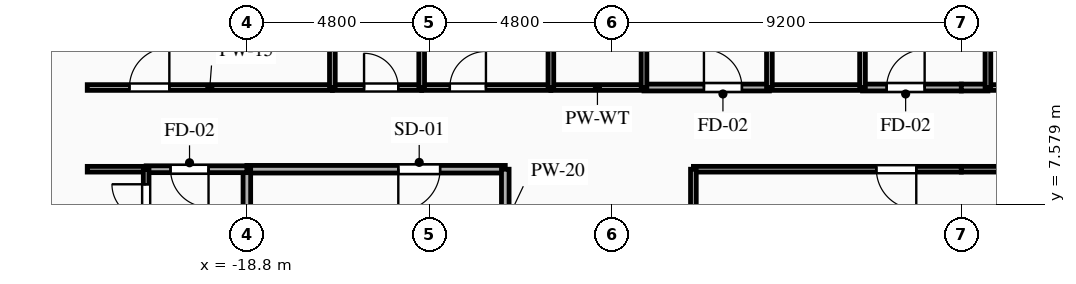
"""IFC4 building model, lengths in metres.
Left out: names, types, materials, properties, quantities, classifications, styles, units other than length and angle.
Written with IfcOpenShell. Run it as: python <this file> out.ifc"""

import sys

from ifc_helpers import new_model, si_unit, direction, frame, frame_2d, origin, place, context, subcontext, project, spatial, rectangle, extrude, element, fill, save


model = new_model("IFC4")
c1 = context("Model", 3, precision=1e-05, world=origin(), true_north=direction((0.0, 1.0)))
c2 = subcontext(c1, "Body", "Model", "MODEL_VIEW")
j1 = project(units=[si_unit("LENGTHUNIT", "METRE"), si_unit("PLANEANGLEUNIT", "RADIAN")], contexts=[c1])
p1 = place(None, origin())
s1 = spatial("IfcSite", under=j1, at=p1, CompositionType="ELEMENT")
p2 = place(p1, origin())
s2 = spatial("IfcBuilding", under=s1, at=p2, CompositionType="ELEMENT")
p3 = place(p2, frame((0.0, 0.0, 57.15)))
s3 = spatial("IfcBuildingStorey", under=s2, at=p3, CompositionType="ELEMENT", Elevation=57.15)
p4 = place(p3, frame((-12.0, 8.5, 0.0), z_axis=(0.0, 0.0, 1.0), x_axis=(-1.0, 0.0, 0.0)))
e1 = element("IfcWall", 1, at=p4, inside=s3, PredefinedType="PARTITIONING", context=c2, shape_type="SweptSolid", body=[
    extrude(rectangle(XDim=6.8, YDim=0.2, at=frame_2d((3.4, 0.0))), origin(), (0.0, 0.0, 1.0), 3.035),
])
p5 = place(p4, frame((1.715, 0.0, 0.0)))
e2 = element("IfcOpeningElement", 2, at=p5, cuts=e1, PredefinedType="OPENING", context=c2, shape_type="SweptSolid", body=[
    extrude(rectangle(XDim=1.1, YDim=2.15, at=frame_2d((0.55, 1.075))), frame((0.0, 0.11, 0.0), z_axis=(0.0, -1.0, 0.0), x_axis=(1.0, 0.0, 0.0)), (0.0, 0.0, 1.0), 0.22),
])
p6 = place(p3, frame((-12.0, 5.6, 0.0), z_axis=(0.0, 0.0, 1.0), x_axis=(0.0, 1.0, 0.0)))
e3 = element("IfcWall", 3, at=p6, inside=s3, PredefinedType="PARTITIONING", context=c2, shape_type="SweptSolid", body=[
    extrude(rectangle(XDim=2.9, YDim=0.2, at=frame_2d((1.45, 0.0))), origin(), (0.0, 0.0, 1.0), 3.035),
])
p7 = place(p3, frame((-18.8, 8.5, 0.0), z_axis=(0.0, 0.0, 1.0), x_axis=(0.0, -1.0, 0.0)))
e4 = element("IfcWall", 4, at=p7, inside=s3, PredefinedType="PARTITIONING", context=c2, shape_type="SweptSolid", body=[
    extrude(rectangle(XDim=2.9, YDim=0.2, at=frame_2d((1.45, 0.0))), origin(), (0.0, 0.0, 1.0), 2.52),
])
p8 = place(p3, frame((-18.8, 8.5, 0.0), z_axis=(0.0, 0.0, 1.0), x_axis=(-1.0, 0.0, 0.0)))
e5 = element("IfcWall", 5, at=p8, inside=s3, PredefinedType="PARTITIONING", context=c2, shape_type="SweptSolid", body=[
    extrude(rectangle(XDim=2.65, YDim=0.18, at=frame_2d((1.325, 0.0))), origin(), (0.0, 0.0, 1.0), 3.035),
])
p9 = place(p8, frame((1.009, 0.0, 0.0)))
e6 = element("IfcOpeningElement", 6, at=p9, cuts=e5, PredefinedType="OPENING", context=c2, shape_type="SweptSolid", body=[
    extrude(rectangle(XDim=1.0, YDim=2.15, at=frame_2d((0.5, 1.075))), frame((0.0, 0.1, 0.0), z_axis=(0.0, -1.0, 0.0), x_axis=(1.0, 0.0, 0.0)), (0.0, 0.0, 1.0), 0.2),
])
p10 = place(p3, frame((-21.45, 8.5, 0.0), z_axis=(0.0, 0.0, 1.0), x_axis=(-1.0, 0.0, 0.0)))
e7 = element("IfcWall", 7, at=p10, inside=s3, PredefinedType="PARTITIONING", context=c2, shape_type="SweptSolid", body=[
    extrude(rectangle(XDim=1.55, YDim=0.15, at=frame_2d((0.775, 0.0))), origin(), (0.0, 0.0, 1.0), 3.035),
])
p11 = place(p3, frame((-23.0, 10.65, 0.0), z_axis=(0.0, 0.0, 1.0), x_axis=(1.0, 0.0, 0.0)))
e8 = element("IfcWall", 8, at=p11, inside=s3, PredefinedType="PARTITIONING", context=c2, shape_type="SweptSolid", body=[
    extrude(rectangle(XDim=6.45, YDim=0.15, at=frame_2d((3.225, 0.0))), origin(), (0.0, 0.0, 1.0), 3.035),
])
p12 = place(p11, frame((1.11, 0.0, 0.0)))
e9 = element("IfcOpeningElement", 9, at=p12, cuts=e8, PredefinedType="OPENING", context=c2, shape_type="SweptSolid", body=[
    extrude(rectangle(XDim=1.05, YDim=2.15, at=frame_2d((0.525, 1.075))), frame((0.0, 0.085, 0.0), z_axis=(0.0, -1.0, 0.0), x_axis=(1.0, 0.0, 0.0)), (0.0, 0.0, 1.0), 0.17),
])
p13 = place(p3, frame((-16.55, 10.65, 0.0), z_axis=(0.0, 0.0, 1.0), x_axis=(1.0, 0.0, 0.0)))
e10 = element("IfcWall", 10, at=p13, inside=s3, PredefinedType="PLUMBINGWALL", context=c2, shape_type="SweptSolid", body=[
    extrude(rectangle(XDim=2.35, YDim=0.15, at=frame_2d((1.175, 0.0))), origin(), (0.0, 0.0, 1.0), 3.035),
])
p14 = place(p13, frame((0.834, 0.0, 0.0)))
e11 = element("IfcOpeningElement", 11, at=p14, cuts=e10, PredefinedType="OPENING", context=c2, shape_type="SweptSolid", body=[
    extrude(rectangle(XDim=0.9, YDim=2.1, at=frame_2d((0.45, 1.05))), frame((0.0, 0.085, 0.0), z_axis=(0.0, -1.0, 0.0), x_axis=(1.0, 0.0, 0.0)), (0.0, 0.0, 1.0), 0.17),
])
p15 = place(p3, frame((-14.2, 10.65, 0.0), z_axis=(0.0, 0.0, 1.0), x_axis=(1.0, 0.0, 0.0)))
e12 = element("IfcWall", 12, at=p15, inside=s3, PredefinedType="PARTITIONING", context=c2, shape_type="SweptSolid", body=[
    extrude(rectangle(XDim=3.4, YDim=0.15, at=frame_2d((1.7, 0.0))), origin(), (0.0, 0.0, 1.0), 3.035),
])
p16 = place(p15, frame((0.741, 0.0, 0.0)))
e13 = element("IfcOpeningElement", 13, at=p16, cuts=e12, PredefinedType="OPENING", context=c2, shape_type="SweptSolid", body=[
    extrude(rectangle(XDim=0.95, YDim=2.1, at=frame_2d((0.475, 1.05))), frame((0.0, 0.085, 0.0), z_axis=(0.0, -1.0, 0.0), x_axis=(1.0, 0.0, 0.0)), (0.0, 0.0, 1.0), 0.17),
])
p17 = place(p3, frame((-8.35, 10.65, 0.0), z_axis=(0.0, 0.0, 1.0), x_axis=(1.0, 0.0, 0.0)))
e14 = element("IfcWall", 14, at=p17, inside=s3, PredefinedType="PARTITIONING", context=c2, shape_type="SweptSolid", body=[
    extrude(rectangle(XDim=3.3, YDim=0.18, at=frame_2d((1.65, 0.0))), origin(), (0.0, 0.0, 1.0), 3.035),
])
p18 = place(p17, frame((1.577, 0.0, 0.0)))
e15 = element("IfcOpeningElement", 15, at=p18, cuts=e14, PredefinedType="OPENING", context=c2, shape_type="SweptSolid", body=[
    extrude(rectangle(XDim=1.0, YDim=2.15, at=frame_2d((0.5, 1.075))), frame((0.0, 0.1, 0.0), z_axis=(0.0, -1.0, 0.0), x_axis=(1.0, 0.0, 0.0)), (0.0, 0.0, 1.0), 0.2),
])
p19 = place(p3, frame((-10.8, 10.65, 0.0), z_axis=(0.0, 0.0, 1.0), x_axis=(1.0, 0.0, 0.0)))
e16 = element("IfcWall", 16, at=p19, inside=s3, PredefinedType="PLUMBINGWALL", context=c2, shape_type="SweptSolid", body=[
    extrude(rectangle(XDim=2.45, YDim=0.15, at=frame_2d((1.225, 0.0))), origin(), (0.0, 0.0, 1.0), 3.035),
])
p20 = place(p3, frame((-2.6, 10.65, 0.0), z_axis=(0.0, 0.0, 1.0), x_axis=(1.0, 0.0, 0.0)))
e17 = element("IfcWall", 17, at=p20, inside=s3, PredefinedType="PARTITIONING", context=c2, shape_type="SweptSolid", body=[
    extrude(rectangle(XDim=2.6, YDim=0.18, at=frame_2d((1.3, 0.0))), origin(), (0.0, 0.0, 1.0), 3.035),
])
p21 = place(p20, frame((0.635, 0.0, 0.0)))
e18 = element("IfcOpeningElement", 18, at=p21, cuts=e17, PredefinedType="OPENING", context=c2, shape_type="SweptSolid", body=[
    extrude(rectangle(XDim=1.0, YDim=2.15, at=frame_2d((0.5, 1.075))), frame((0.0, 0.1, 0.0), z_axis=(0.0, -1.0, 0.0), x_axis=(1.0, 0.0, 0.0)), (0.0, 0.0, 1.0), 0.2),
])
p22 = place(p3, frame((-5.05, 10.65, 0.0), z_axis=(0.0, 0.0, 1.0), x_axis=(1.0, 0.0, 0.0)))
e19 = element("IfcWall", 19, at=p22, inside=s3, PredefinedType="PLUMBINGWALL", context=c2, shape_type="SweptSolid", body=[
    extrude(rectangle(XDim=2.45, YDim=0.15, at=frame_2d((1.225, 0.0))), origin(), (0.0, 0.0, 1.0), 3.035),
])
p23 = place(p3, frame((0.0, 8.5, 0.0), z_axis=(0.0, 0.0, 1.0), x_axis=(-1.0, 0.0, 0.0)))
e20 = element("IfcWall", 20, at=p23, inside=s3, PredefinedType="PARTITIONING", context=c2, shape_type="SweptSolid", body=[
    extrude(rectangle(XDim=7.05, YDim=0.15, at=frame_2d((3.525, 0.0))), origin(), (0.0, 0.0, 1.0), 3.035),
])
p24 = place(p23, frame((1.185, 0.0, 0.0)))
e21 = element("IfcOpeningElement", 21, at=p24, cuts=e20, PredefinedType="OPENING", context=c2, shape_type="SweptSolid", body=[
    extrude(rectangle(XDim=1.05, YDim=2.15, at=frame_2d((0.525, 1.075))), frame((0.0, 0.085, 0.0), z_axis=(0.0, -1.0, 0.0), x_axis=(1.0, 0.0, 0.0)), (0.0, 0.0, 1.0), 0.17),
])
p25 = place(p3, frame((0.0, 10.65, 0.0), z_axis=(0.0, 0.0, 1.0), x_axis=(1.0, 0.0, 0.0)))
e22 = element("IfcWall", 22, at=p25, inside=s3, PredefinedType="PARTITIONING", context=c2, shape_type="SweptSolid", body=[
    extrude(rectangle(XDim=0.7, YDim=0.18, at=frame_2d((0.35, 0.0))), origin(), (0.0, 0.0, 1.0), 3.035),
])
p26 = place(p3, frame((0.7, 10.65, 0.0), z_axis=(0.0, 0.0, 1.0), x_axis=(1.0, 0.0, 0.0)))
e23 = element("IfcWall", 23, at=p26, inside=s3, PredefinedType="PLUMBINGWALL", context=c2, shape_type="SweptSolid", body=[
    extrude(rectangle(XDim=2.45, YDim=0.15, at=frame_2d((1.225, 0.0))), origin(), (0.0, 0.0, 1.0), 3.035),
])
for number, where, z_axis, x_axis in (
    (24, (7.05, 8.5, 0.0), (0.0, 0.0, 1.0), (-1.0, 0.0, 0.0)),
    (25, (-7.05, 8.5, 0.0), (0.0, 0.0, 1.0), (0.0, -1.0, 0.0)),
):
    element("IfcWall", number, at=place(p3, frame(where, z_axis=z_axis, x_axis=x_axis)), inside=s3, PredefinedType="PARTITIONING", context=c2, shape_type="SweptSolid", body=[
        extrude(rectangle(XDim=7.05, YDim=0.15, at=frame_2d((3.525, 0.0))), origin(), (0.0, 0.0, 1.0), 3.035),
    ])
p27 = place(p3, frame((-21.45, 6.808, 0.0), z_axis=(0.0, 0.0, 1.0), x_axis=(0.0, 1.0, 0.0)))
e26 = element("IfcWall", 26, at=p27, inside=s3, PredefinedType="PARTITIONING", context=c2, shape_type="SweptSolid", body=[
    extrude(rectangle(XDim=1.692, YDim=0.15, at=frame_2d((0.846, 0.0))), origin(), (0.0, 0.0, 1.0), 3.035),
])
p28 = place(p27, frame((0.396, 0.0, 0.0)))
e27 = element("IfcOpeningElement", 27, at=p28, cuts=e26, PredefinedType="OPENING", context=c2, shape_type="SweptSolid", body=[
    extrude(rectangle(XDim=0.9, YDim=2.1, at=frame_2d((0.45, 1.05))), frame((0.0, 0.085, 0.0), z_axis=(0.0, -1.0, 0.0), x_axis=(1.0, 0.0, 0.0)), (0.0, 0.0, 1.0), 0.17),
])
for number, where, z_axis, x_axis in (
    (28, (-16.55, 19.4, 0.0), (0.0, 0.0, 1.0), (0.0, -1.0, 0.0)),
    (29, (-14.2, 19.4, 0.0), (0.0, 0.0, 1.0), (0.0, -1.0, 0.0)),
):
    element("IfcWall", number, at=place(p3, frame(where, z_axis=z_axis, x_axis=x_axis)), inside=s3, PredefinedType="PLUMBINGWALL", context=c2, shape_type="SweptSolid", body=[
        extrude(rectangle(XDim=8.75, YDim=0.15, at=frame_2d((4.375, 0.0))), origin(), (0.0, 0.0, 1.0), 3.035),
    ])
for number, where, z_axis, x_axis in (
    (30, (-10.8, 12.8, 0.0), (0.0, 0.0, 1.0), (0.0, -1.0, 0.0)),
    (31, (-8.35, 10.65, 0.0), (0.0, 0.0, 1.0), (0.0, 1.0, 0.0)),
    (32, (-5.05, 12.8, 0.0), (0.0, 0.0, 1.0), (0.0, -1.0, 0.0)),
    (33, (-2.6, 10.65, 0.0), (0.0, 0.0, 1.0), (0.0, 1.0, 0.0)),
    (34, (0.7, 12.8, 0.0), (0.0, 0.0, 1.0), (0.0, -1.0, 0.0)),
):
    element("IfcWall", number, at=place(p3, frame(where, z_axis=z_axis, x_axis=x_axis)), inside=s3, PredefinedType="PLUMBINGWALL", context=c2, shape_type="SweptSolid", body=[
        extrude(rectangle(XDim=2.15, YDim=0.15, at=frame_2d((1.075, 0.0))), origin(), (0.0, 0.0, 1.0), 3.035),
    ])
p29 = place(p5, origin())
e35 = element("IfcDoor", 35, at=p29, inside=s3, OperationType="SINGLE_SWING_RIGHT", PredefinedType="DOOR", context=c2, shape_type="SweptSolid", body=[
    extrude(rectangle(XDim=1.1, YDim=2.15, at=frame_2d((0.55, 1.075))), frame((0.0, 0.025, 0.0), z_axis=(0.0, -1.0, 0.0), x_axis=(1.0, 0.0, 0.0)), (0.0, 0.0, 1.0), 0.05),
])
fill(e2, e35)
p30 = place(p9, origin())
e36 = element("IfcDoor", 36, at=p30, inside=s3, OperationType="SINGLE_SWING_LEFT", PredefinedType="DOOR", context=c2, shape_type="SweptSolid", body=[
    extrude(rectangle(XDim=1.0, YDim=2.15, at=frame_2d((0.5, 1.075))), frame((0.0, 0.025, 0.0), z_axis=(0.0, -1.0, 0.0), x_axis=(1.0, 0.0, 0.0)), (0.0, 0.0, 1.0), 0.05),
])
fill(e6, e36)
p31 = place(p12, origin())
e37 = element("IfcDoor", 37, at=p31, inside=s3, OperationType="SINGLE_SWING_RIGHT", PredefinedType="DOOR", context=c2, shape_type="SweptSolid", body=[
    extrude(rectangle(XDim=1.05, YDim=2.15, at=frame_2d((0.525, 1.075))), frame((0.0, 0.025, 0.0), z_axis=(0.0, -1.0, 0.0), x_axis=(1.0, 0.0, 0.0)), (0.0, 0.0, 1.0), 0.05),
])
fill(e9, e37)
p32 = place(p14, origin())
e38 = element("IfcDoor", 38, at=p32, inside=s3, OperationType="SINGLE_SWING_LEFT", PredefinedType="DOOR", context=c2, shape_type="SweptSolid", body=[
    extrude(rectangle(XDim=0.9, YDim=2.1, at=frame_2d((0.45, 1.05))), frame((0.0, 0.025, 0.0), z_axis=(0.0, -1.0, 0.0), x_axis=(1.0, 0.0, 0.0)), (0.0, 0.0, 1.0), 0.05),
])
fill(e11, e38)
p33 = place(p16, origin())
e39 = element("IfcDoor", 39, at=p33, inside=s3, OperationType="SINGLE_SWING_RIGHT", PredefinedType="DOOR", context=c2, shape_type="SweptSolid", body=[
    extrude(rectangle(XDim=0.95, YDim=2.1, at=frame_2d((0.475, 1.05))), frame((0.0, 0.025, 0.0), z_axis=(0.0, -1.0, 0.0), x_axis=(1.0, 0.0, 0.0)), (0.0, 0.0, 1.0), 0.05),
])
fill(e13, e39)
p34 = place(p18, origin())
e40 = element("IfcDoor", 40, at=p34, inside=s3, OperationType="SINGLE_SWING_LEFT", PredefinedType="DOOR", context=c2, shape_type="SweptSolid", body=[
    extrude(rectangle(XDim=1.0, YDim=2.15, at=frame_2d((0.5, 1.075))), frame((0.0, 0.025, 0.0), z_axis=(0.0, -1.0, 0.0), x_axis=(1.0, 0.0, 0.0)), (0.0, 0.0, 1.0), 0.05),
])
fill(e15, e40)
p35 = place(p21, origin())
e41 = element("IfcDoor", 41, at=p35, inside=s3, OperationType="SINGLE_SWING_RIGHT", PredefinedType="DOOR", context=c2, shape_type="SweptSolid", body=[
    extrude(rectangle(XDim=1.0, YDim=2.15, at=frame_2d((0.5, 1.075))), frame((0.0, 0.025, 0.0), z_axis=(0.0, -1.0, 0.0), x_axis=(1.0, 0.0, 0.0)), (0.0, 0.0, 1.0), 0.05),
])
fill(e18, e41)
p36 = place(p24, origin())
e42 = element("IfcDoor", 42, at=p36, inside=s3, OperationType="SINGLE_SWING_LEFT", PredefinedType="DOOR", context=c2, shape_type="SweptSolid", body=[
    extrude(rectangle(XDim=1.05, YDim=2.15, at=frame_2d((0.525, 1.075))), frame((0.0, 0.025, 0.0), z_axis=(0.0, -1.0, 0.0), x_axis=(1.0, 0.0, 0.0)), (0.0, 0.0, 1.0), 0.05),
])
fill(e21, e42)
p37 = place(p28, origin())
e43 = element("IfcDoor", 43, at=p37, inside=s3, OperationType="SINGLE_SWING_RIGHT", PredefinedType="DOOR", context=c2, shape_type="SweptSolid", body=[
    extrude(rectangle(XDim=0.9, YDim=2.1, at=frame_2d((0.45, 1.05))), frame((0.0, 0.025, 0.0), z_axis=(0.0, -1.0, 0.0), x_axis=(1.0, 0.0, 0.0)), (0.0, 0.0, 1.0), 0.05),
])
fill(e27, e43)
save(model, sys.argv[1])
